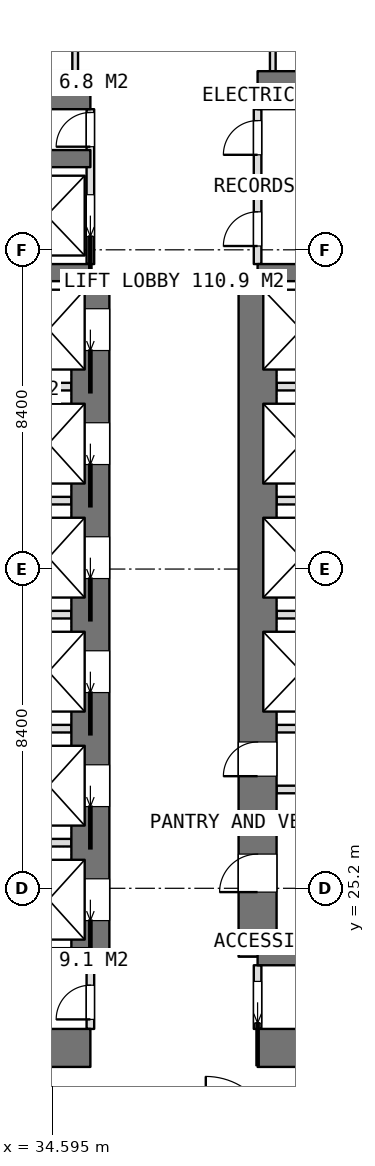
"""IFC4 building model, lengths in metres.
Left out: names, types, materials, properties, quantities, classifications, styles, units other than length and angle.
Written with IfcOpenShell. Run it as: python <this file> out.ifc"""

import sys

from ifc_helpers import new_model, si_unit, direction, frame, frame_2d, origin, place, context, subcontext, project, spatial, rectangle, extrude, element, fill, save


model = new_model("IFC4")
c1 = context("Model", 3, precision=1e-05, world=origin(), true_north=direction((0.0, 1.0)))
c2 = subcontext(c1, "Body", "Model", "MODEL_VIEW")
j1 = project(units=[si_unit("LENGTHUNIT", "METRE"), si_unit("PLANEANGLEUNIT", "RADIAN")], contexts=[c1])
p1 = place(None, origin())
s1 = spatial("IfcSite", under=j1, at=p1, CompositionType="ELEMENT")
p2 = place(p1, origin())
s2 = spatial("IfcBuilding", under=s1, at=p2, CompositionType="ELEMENT")
p3 = place(p2, frame((0.0, 0.0, 155.3)))
s3 = spatial("IfcBuildingStorey", under=s2, at=p3, CompositionType="ELEMENT", Elevation=155.3)
p4 = place(p3, frame((25.2, 21.0, 0.0), z_axis=(0.0, 0.0, 1.0), x_axis=(1.0, 0.0, 0.0)))
e1 = element("IfcWall", 1, at=p4, inside=s3, PredefinedType="SHEAR", context=c2, shape_type="SweptSolid", body=[
    extrude(rectangle(XDim=10.4, YDim=1.0, at=frame_2d((5.2, 0.0))), origin(), (0.0, 0.0, 1.0), 3.75),
])
p5 = place(p3, frame((40.0, 21.0, 0.0), z_axis=(0.0, 0.0, 1.0), x_axis=(1.0, 0.0, 0.0)))
e2 = element("IfcWall", 2, at=p5, inside=s3, PredefinedType="SHEAR", context=c2, shape_type="SweptSolid", body=[
    extrude(rectangle(XDim=10.4, YDim=1.0, at=frame_2d((5.2, 0.0))), origin(), (0.0, 0.0, 1.0), 3.75),
])
p6 = place(p3, frame((25.2, 46.2, 0.0), z_axis=(0.0, 0.0, 1.0), x_axis=(1.0, 0.0, 0.0)))
e3 = element("IfcWall", 3, at=p6, inside=s3, PredefinedType="SHEAR", context=c2, shape_type="SweptSolid", body=[
    extrude(rectangle(XDim=10.4, YDim=1.0, at=frame_2d((5.2, 0.0))), origin(), (0.0, 0.0, 1.0), 3.75),
])
p7 = place(p3, frame((40.0, 46.2, 0.0), z_axis=(0.0, 0.0, 1.0), x_axis=(1.0, 0.0, 0.0)))
e4 = element("IfcWall", 4, at=p7, inside=s3, PredefinedType="SHEAR", context=c2, shape_type="SweptSolid", body=[
    extrude(rectangle(XDim=10.4, YDim=1.0, at=frame_2d((5.2, 0.0))), origin(), (0.0, 0.0, 1.0), 3.75),
])
p8 = place(p3, frame((35.6, 23.4, 0.0), z_axis=(0.0, 0.0, 1.0), x_axis=(0.0, 1.0, 0.0)))
e5 = element("IfcWall", 5, at=p8, inside=s3, PredefinedType="SHEAR", context=c2, shape_type="SweptSolid", body=[
    extrude(rectangle(XDim=18.0, YDim=1.0, at=frame_2d((9.0, 0.0))), origin(), (0.0, 0.0, 1.0), 3.75),
])
p9 = place(p8, frame((0.95, 0.0, 0.0)))
e6 = element("IfcOpeningElement", 6, at=p9, cuts=e5, PredefinedType="OPENING", context=c2, shape_type="SweptSolid", body=[
    extrude(rectangle(XDim=1.1, YDim=2.1, at=frame_2d((0.55, 1.05))), frame((0.0, 0.51, 0.0), z_axis=(0.0, -1.0, 0.0), x_axis=(1.0, 0.0, 0.0)), (0.0, 0.0, 1.0), 1.02),
])
p10 = place(p8, frame((3.95, 0.0, 0.0)))
e7 = element("IfcOpeningElement", 7, at=p10, cuts=e5, PredefinedType="OPENING", context=c2, shape_type="SweptSolid", body=[
    extrude(rectangle(XDim=1.1, YDim=2.1, at=frame_2d((0.55, 1.05))), frame((0.0, 0.51, 0.0), z_axis=(0.0, -1.0, 0.0), x_axis=(1.0, 0.0, 0.0)), (0.0, 0.0, 1.0), 1.02),
])
p11 = place(p8, frame((6.95, 0.0, 0.0)))
e8 = element("IfcOpeningElement", 8, at=p11, cuts=e5, PredefinedType="OPENING", context=c2, shape_type="SweptSolid", body=[
    extrude(rectangle(XDim=1.1, YDim=2.1, at=frame_2d((0.55, 1.05))), frame((0.0, 0.51, 0.0), z_axis=(0.0, -1.0, 0.0), x_axis=(1.0, 0.0, 0.0)), (0.0, 0.0, 1.0), 1.02),
])
p12 = place(p8, frame((9.95, 0.0, 0.0)))
e9 = element("IfcOpeningElement", 9, at=p12, cuts=e5, PredefinedType="OPENING", context=c2, shape_type="SweptSolid", body=[
    extrude(rectangle(XDim=1.1, YDim=2.1, at=frame_2d((0.55, 1.05))), frame((0.0, 0.51, 0.0), z_axis=(0.0, -1.0, 0.0), x_axis=(1.0, 0.0, 0.0)), (0.0, 0.0, 1.0), 1.02),
])
p13 = place(p8, frame((12.95, 0.0, 0.0)))
e10 = element("IfcOpeningElement", 10, at=p13, cuts=e5, PredefinedType="OPENING", context=c2, shape_type="SweptSolid", body=[
    extrude(rectangle(XDim=1.1, YDim=2.1, at=frame_2d((0.55, 1.05))), frame((0.0, 0.51, 0.0), z_axis=(0.0, -1.0, 0.0), x_axis=(1.0, 0.0, 0.0)), (0.0, 0.0, 1.0), 1.02),
])
p14 = place(p8, frame((15.95, 0.0, 0.0)))
e11 = element("IfcOpeningElement", 11, at=p14, cuts=e5, PredefinedType="OPENING", context=c2, shape_type="SweptSolid", body=[
    extrude(rectangle(XDim=1.1, YDim=2.1, at=frame_2d((0.55, 1.05))), frame((0.0, 0.51, 0.0), z_axis=(0.0, -1.0, 0.0), x_axis=(1.0, 0.0, 0.0)), (0.0, 0.0, 1.0), 1.02),
])
p15 = place(p3, frame((40.0, 23.4, 0.0), z_axis=(0.0, 0.0, 1.0), x_axis=(0.0, 1.0, 0.0)))
e12 = element("IfcWall", 12, at=p15, inside=s3, PredefinedType="SHEAR", context=c2, shape_type="SweptSolid", body=[
    extrude(rectangle(XDim=18.0, YDim=1.0, at=frame_2d((9.0, 0.0))), origin(), (0.0, 0.0, 1.0), 3.75),
])
p16 = place(p15, frame((1.7, 0.0, 0.0)))
e13 = element("IfcOpeningElement", 13, at=p16, cuts=e12, PredefinedType="OPENING", context=c2, shape_type="SweptSolid", body=[
    extrude(rectangle(XDim=1.0, YDim=2.1, at=frame_2d((0.5, 1.05))), frame((0.0, 0.51, 0.0), z_axis=(0.0, -1.0, 0.0), x_axis=(1.0, 0.0, 0.0)), (0.0, 0.0, 1.0), 1.02),
])
p17 = place(p15, frame((4.75, 0.0, 0.0)))
e14 = element("IfcOpeningElement", 14, at=p17, cuts=e12, PredefinedType="OPENING", context=c2, shape_type="SweptSolid", body=[
    extrude(rectangle(XDim=0.9, YDim=2.1, at=frame_2d((0.45, 1.05))), frame((0.0, 0.51, 0.0), z_axis=(0.0, -1.0, 0.0), x_axis=(1.0, 0.0, 0.0)), (0.0, 0.0, 1.0), 1.02),
])
for number, where, z_axis, x_axis in (
    (15, (31.8, 23.4, 0.0), (0.0, 0.0, 1.0), (1.0, 0.0, 0.0)),
    (16, (31.8, 41.4, 0.0), (0.0, 0.0, 1.0), (1.0, 0.0, 0.0)),
    (17, (31.8, 44.4, 0.0), (0.0, 0.0, 1.0), (1.0, 0.0, 0.0)),
    (18, (40.0, 23.4, 0.0), (0.0, 0.0, 1.0), (1.0, 0.0, 0.0)),
    (19, (40.0, 41.4, 0.0), (0.0, 0.0, 1.0), (1.0, 0.0, 0.0)),
):
    element("IfcWall", number, at=place(p3, frame(where, z_axis=z_axis, x_axis=x_axis)), inside=s3, PredefinedType="SHEAR", context=c2, shape_type="SweptSolid", body=[
        extrude(rectangle(XDim=3.8, YDim=0.45, at=frame_2d((1.9, 0.0))), origin(), (0.0, 0.0, 1.0), 3.75),
    ])
for number, where, z_axis, x_axis in (
    (20, (32.025, 26.4, 0.0), (0.0, 0.0, 1.0), (1.0, 0.0, 0.0)),
    (21, (32.025, 29.4, 0.0), (0.0, 0.0, 1.0), (1.0, 0.0, 0.0)),
    (22, (32.025, 32.4, 0.0), (0.0, 0.0, 1.0), (1.0, 0.0, 0.0)),
    (23, (32.025, 35.4, 0.0), (0.0, 0.0, 1.0), (1.0, 0.0, 0.0)),
    (24, (32.025, 38.4, 0.0), (0.0, 0.0, 1.0), (1.0, 0.0, 0.0)),
):
    element("IfcWall", number, at=place(p3, frame(where, z_axis=z_axis, x_axis=x_axis)), inside=s3, PredefinedType="PARTITIONING", context=c2, shape_type="SweptSolid", body=[
        extrude(rectangle(XDim=3.075, YDim=0.2, at=frame_2d((1.538, 0.0))), origin(), (0.0, 0.0, 1.0), 3.5),
    ])
for number, where, z_axis, x_axis in (
    (25, (40.5, 29.4, 0.0), (0.0, 0.0, 1.0), (1.0, 0.0, 0.0)),
    (26, (40.5, 32.4, 0.0), (0.0, 0.0, 1.0), (1.0, 0.0, 0.0)),
    (27, (40.5, 35.4, 0.0), (0.0, 0.0, 1.0), (1.0, 0.0, 0.0)),
    (28, (40.5, 38.4, 0.0), (0.0, 0.0, 1.0), (1.0, 0.0, 0.0)),
):
    element("IfcWall", number, at=place(p3, frame(where, z_axis=z_axis, x_axis=x_axis)), inside=s3, PredefinedType="PARTITIONING", context=c2, shape_type="SweptSolid", body=[
        extrude(rectangle(XDim=3.075, YDim=0.2, at=frame_2d((1.538, 0.0))), origin(), (0.0, 0.0, 1.0), 3.5),
    ])
p18 = place(p3, frame((40.0, 21.5, 0.0), z_axis=(0.0, 0.0, 1.0), x_axis=(0.0, 1.0, 0.0)))
e29 = element("IfcWall", 29, at=p18, inside=s3, PredefinedType="PARTITIONING", context=c2, shape_type="SweptSolid", body=[
    extrude(rectangle(XDim=1.675, YDim=0.2, at=frame_2d((0.837, 0.0))), origin(), (0.0, 0.0, 1.0), 3.5),
])
p19 = place(p18, frame((0.15, 0.0, 0.0)))
e30 = element("IfcOpeningElement", 30, at=p19, cuts=e29, PredefinedType="OPENING", context=c2, shape_type="SweptSolid", body=[
    extrude(rectangle(XDim=1.1, YDim=2.1, at=frame_2d((0.55, 1.05))), frame((0.0, 0.11, 0.0), z_axis=(0.0, -1.0, 0.0), x_axis=(1.0, 0.0, 0.0)), (0.0, 0.0, 1.0), 0.22),
])
p20 = place(p3, frame((40.0, 41.625, 0.0), z_axis=(0.0, 0.0, 1.0), x_axis=(0.0, 1.0, 0.0)))
e31 = element("IfcWall", 31, at=p20, inside=s3, PredefinedType="PARTITIONING", context=c2, shape_type="SweptSolid", body=[
    extrude(rectangle(XDim=4.075, YDim=0.2, at=frame_2d((2.038, 0.0))), origin(), (0.0, 0.0, 1.0), 3.5),
])
p21 = place(p20, frame((2.875, 0.0, 0.0)))
e32 = element("IfcOpeningElement", 32, at=p21, cuts=e31, PredefinedType="OPENING", context=c2, shape_type="SweptSolid", body=[
    extrude(rectangle(XDim=0.9, YDim=2.1, at=frame_2d((0.45, 1.05))), frame((0.0, 0.11, 0.0), z_axis=(0.0, -1.0, 0.0), x_axis=(1.0, 0.0, 0.0)), (0.0, 0.0, 1.0), 0.22),
])
p22 = place(p20, frame((0.475, 0.0, 0.0)))
e33 = element("IfcOpeningElement", 33, at=p22, cuts=e31, PredefinedType="OPENING", context=c2, shape_type="SweptSolid", body=[
    extrude(rectangle(XDim=0.9, YDim=2.1, at=frame_2d((0.45, 1.05))), frame((0.0, 0.11, 0.0), z_axis=(0.0, -1.0, 0.0), x_axis=(1.0, 0.0, 0.0)), (0.0, 0.0, 1.0), 0.22),
])
p23 = place(p3, frame((35.6, 41.625, 0.0), z_axis=(0.0, 0.0, 1.0), x_axis=(0.0, 1.0, 0.0)))
e34 = element("IfcWall", 34, at=p23, inside=s3, PredefinedType="PARTITIONING", context=c2, shape_type="SweptSolid", body=[
    extrude(rectangle(XDim=4.075, YDim=0.2, at=frame_2d((2.038, 0.0))), origin(), (0.0, 0.0, 1.0), 3.5),
])
p24 = place(p23, frame((3.088, 0.0, 0.0)))
e35 = element("IfcOpeningElement", 35, at=p24, cuts=e34, PredefinedType="OPENING", context=c2, shape_type="SweptSolid", body=[
    extrude(rectangle(XDim=0.9, YDim=2.1, at=frame_2d((0.45, 1.05))), frame((0.0, 0.11, 0.0), z_axis=(0.0, -1.0, 0.0), x_axis=(1.0, 0.0, 0.0)), (0.0, 0.0, 1.0), 0.22),
])
p25 = place(p23, frame((0.725, 0.0, 0.0)))
e36 = element("IfcOpeningElement", 36, at=p25, cuts=e34, PredefinedType="OPENING", context=c2, shape_type="SweptSolid", body=[
    extrude(rectangle(XDim=1.1, YDim=2.1, at=frame_2d((0.55, 1.05))), frame((0.0, 0.11, 0.0), z_axis=(0.0, -1.0, 0.0), x_axis=(1.0, 0.0, 0.0)), (0.0, 0.0, 1.0), 0.22),
])
p26 = place(p3, frame((35.6, 21.5, 0.0), z_axis=(0.0, 0.0, 1.0), x_axis=(0.0, 1.0, 0.0)))
e37 = element("IfcWall", 37, at=p26, inside=s3, PredefinedType="PARTITIONING", context=c2, shape_type="SweptSolid", body=[
    extrude(rectangle(XDim=1.675, YDim=0.2, at=frame_2d((0.837, 0.0))), origin(), (0.0, 0.0, 1.0), 3.5),
])
p27 = place(p26, frame((0.25, 0.0, 0.0)))
e38 = element("IfcOpeningElement", 38, at=p27, cuts=e37, PredefinedType="OPENING", context=c2, shape_type="SweptSolid", body=[
    extrude(rectangle(XDim=0.9, YDim=2.1, at=frame_2d((0.45, 1.05))), frame((0.0, 0.11, 0.0), z_axis=(0.0, -1.0, 0.0), x_axis=(1.0, 0.0, 0.0)), (0.0, 0.0, 1.0), 0.22),
])
p28 = place(p3, frame((40.5, 27.8, 0.0), z_axis=(0.0, 0.0, 1.0), x_axis=(1.0, 0.0, 0.0)))
e39 = element("IfcWall", 39, at=p28, inside=s3, PredefinedType="PARTITIONING", context=c2, shape_type="SweptSolid", body=[
    extrude(rectangle(XDim=3.075, YDim=0.2, at=frame_2d((1.538, 0.0))), origin(), (0.0, 0.0, 1.0), 3.5),
])
p29 = place(p3, frame((40.0, 43.7, 0.0), z_axis=(0.0, 0.0, 1.0), x_axis=(1.0, 0.0, 0.0)))
e40 = element("IfcWall", 40, at=p29, inside=s3, PredefinedType="PARTITIONING", context=c2, shape_type="SweptSolid", body=[
    extrude(rectangle(XDim=3.575, YDim=0.2, at=frame_2d((1.788, 0.0))), origin(), (0.0, 0.0, 1.0), 3.5),
])
for number, where, z_axis, x_axis in (
    (41, (40.4, 46.7, 0.0), (0.0, 0.0, 1.0), (0.0, 1.0, 0.0)),
    (42, (35.2, 46.7, 0.0), (0.0, 0.0, 1.0), (0.0, 1.0, 0.0)),
):
    element("IfcWall", number, at=place(p3, frame(where, z_axis=z_axis, x_axis=x_axis)), inside=s3, PredefinedType="PARTITIONING", context=c2, shape_type="SweptSolid", body=[
        extrude(rectangle(XDim=2.625, YDim=0.15, at=frame_2d((1.312, 0.0))), origin(), (0.0, 0.0, 1.0), 3.5),
    ])
p30 = place(p19, origin())
e43 = element("IfcDoor", 43, at=p30, inside=s3, OperationType="SLIDING_TO_LEFT", PredefinedType="DOOR", context=c2, shape_type="SweptSolid", body=[
    extrude(rectangle(XDim=1.1, YDim=2.1, at=frame_2d((0.55, 1.05))), frame((0.0, 0.025, 0.0), z_axis=(0.0, -1.0, 0.0), x_axis=(1.0, 0.0, 0.0)), (0.0, 0.0, 1.0), 0.05),
])
fill(e30, e43)
p31 = place(p27, origin())
e44 = element("IfcDoor", 44, at=p31, inside=s3, OperationType="SINGLE_SWING_LEFT", PredefinedType="DOOR", context=c2, shape_type="SweptSolid", body=[
    extrude(rectangle(XDim=0.9, YDim=2.1, at=frame_2d((0.45, 1.05))), frame((0.0, 0.025, 0.0), z_axis=(0.0, -1.0, 0.0), x_axis=(1.0, 0.0, 0.0)), (0.0, 0.0, 1.0), 0.05),
])
fill(e38, e44)
p32 = place(p21, origin())
e45 = element("IfcDoor", 45, at=p32, inside=s3, OperationType="SINGLE_SWING_LEFT", PredefinedType="DOOR", context=c2, shape_type="SweptSolid", body=[
    extrude(rectangle(XDim=0.9, YDim=2.1, at=frame_2d((0.45, 1.05))), frame((0.0, 0.025, 0.0), z_axis=(0.0, -1.0, 0.0), x_axis=(1.0, 0.0, 0.0)), (0.0, 0.0, 1.0), 0.05),
])
fill(e32, e45)
p33 = place(p22, origin())
e46 = element("IfcDoor", 46, at=p33, inside=s3, OperationType="SINGLE_SWING_LEFT", PredefinedType="DOOR", context=c2, shape_type="SweptSolid", body=[
    extrude(rectangle(XDim=0.9, YDim=2.1, at=frame_2d((0.45, 1.05))), frame((0.0, 0.025, 0.0), z_axis=(0.0, -1.0, 0.0), x_axis=(1.0, 0.0, 0.0)), (0.0, 0.0, 1.0), 0.05),
])
fill(e33, e46)
p34 = place(p16, origin())
e47 = element("IfcDoor", 47, at=p34, inside=s3, OperationType="SINGLE_SWING_LEFT", PredefinedType="DOOR", context=c2, shape_type="SweptSolid", body=[
    extrude(rectangle(XDim=1.0, YDim=2.1, at=frame_2d((0.5, 1.05))), frame((0.0, 0.025, 0.0), z_axis=(0.0, -1.0, 0.0), x_axis=(1.0, 0.0, 0.0)), (0.0, 0.0, 1.0), 0.05),
])
fill(e13, e47)
p35 = place(p17, origin())
e48 = element("IfcDoor", 48, at=p35, inside=s3, OperationType="SINGLE_SWING_LEFT", PredefinedType="DOOR", context=c2, shape_type="SweptSolid", body=[
    extrude(rectangle(XDim=0.9, YDim=2.1, at=frame_2d((0.45, 1.05))), frame((0.0, 0.025, 0.0), z_axis=(0.0, -1.0, 0.0), x_axis=(1.0, 0.0, 0.0)), (0.0, 0.0, 1.0), 0.05),
])
fill(e14, e48)
p36 = place(p24, origin())
e49 = element("IfcDoor", 49, at=p36, inside=s3, OperationType="SINGLE_SWING_LEFT", PredefinedType="DOOR", context=c2, shape_type="SweptSolid", body=[
    extrude(rectangle(XDim=0.9, YDim=2.1, at=frame_2d((0.45, 1.05))), frame((0.0, 0.025, 0.0), z_axis=(0.0, -1.0, 0.0), x_axis=(1.0, 0.0, 0.0)), (0.0, 0.0, 1.0), 0.05),
])
fill(e35, e49)
p37 = place(p9, origin())
e50 = element("IfcDoor", 50, at=p37, inside=s3, OperationType="SLIDING_TO_LEFT", PredefinedType="USERDEFINED", context=c2, shape_type="SweptSolid", body=[
    extrude(rectangle(XDim=1.1, YDim=2.1, at=frame_2d((0.55, 1.05))), frame((0.0, 0.025, 0.0), z_axis=(0.0, -1.0, 0.0), x_axis=(1.0, 0.0, 0.0)), (0.0, 0.0, 1.0), 0.05),
])
fill(e6, e50)
p38 = place(p10, origin())
e51 = element("IfcDoor", 51, at=p38, inside=s3, OperationType="SLIDING_TO_LEFT", PredefinedType="USERDEFINED", context=c2, shape_type="SweptSolid", body=[
    extrude(rectangle(XDim=1.1, YDim=2.1, at=frame_2d((0.55, 1.05))), frame((0.0, 0.025, 0.0), z_axis=(0.0, -1.0, 0.0), x_axis=(1.0, 0.0, 0.0)), (0.0, 0.0, 1.0), 0.05),
])
fill(e7, e51)
p39 = place(p11, origin())
e52 = element("IfcDoor", 52, at=p39, inside=s3, OperationType="SLIDING_TO_LEFT", PredefinedType="USERDEFINED", context=c2, shape_type="SweptSolid", body=[
    extrude(rectangle(XDim=1.1, YDim=2.1, at=frame_2d((0.55, 1.05))), frame((0.0, 0.025, 0.0), z_axis=(0.0, -1.0, 0.0), x_axis=(1.0, 0.0, 0.0)), (0.0, 0.0, 1.0), 0.05),
])
fill(e8, e52)
p40 = place(p12, origin())
e53 = element("IfcDoor", 53, at=p40, inside=s3, OperationType="SLIDING_TO_LEFT", PredefinedType="USERDEFINED", context=c2, shape_type="SweptSolid", body=[
    extrude(rectangle(XDim=1.1, YDim=2.1, at=frame_2d((0.55, 1.05))), frame((0.0, 0.025, 0.0), z_axis=(0.0, -1.0, 0.0), x_axis=(1.0, 0.0, 0.0)), (0.0, 0.0, 1.0), 0.05),
])
fill(e9, e53)
p41 = place(p13, origin())
e54 = element("IfcDoor", 54, at=p41, inside=s3, OperationType="SLIDING_TO_LEFT", PredefinedType="USERDEFINED", context=c2, shape_type="SweptSolid", body=[
    extrude(rectangle(XDim=1.1, YDim=2.1, at=frame_2d((0.55, 1.05))), frame((0.0, 0.025, 0.0), z_axis=(0.0, -1.0, 0.0), x_axis=(1.0, 0.0, 0.0)), (0.0, 0.0, 1.0), 0.05),
])
fill(e10, e54)
p42 = place(p14, origin())
e55 = element("IfcDoor", 55, at=p42, inside=s3, OperationType="SLIDING_TO_LEFT", PredefinedType="USERDEFINED", context=c2, shape_type="SweptSolid", body=[
    extrude(rectangle(XDim=1.1, YDim=2.1, at=frame_2d((0.55, 1.05))), frame((0.0, 0.025, 0.0), z_axis=(0.0, -1.0, 0.0), x_axis=(1.0, 0.0, 0.0)), (0.0, 0.0, 1.0), 0.05),
])
fill(e11, e55)
p43 = place(p25, origin())
e56 = element("IfcDoor", 56, at=p43, inside=s3, OperationType="SLIDING_TO_LEFT", PredefinedType="USERDEFINED", context=c2, shape_type="SweptSolid", body=[
    extrude(rectangle(XDim=1.1, YDim=2.1, at=frame_2d((0.55, 1.05))), frame((0.0, 0.025, 0.0), z_axis=(0.0, -1.0, 0.0), x_axis=(1.0, 0.0, 0.0)), (0.0, 0.0, 1.0), 0.05),
])
fill(e36, e56)
save(model, sys.argv[1])
